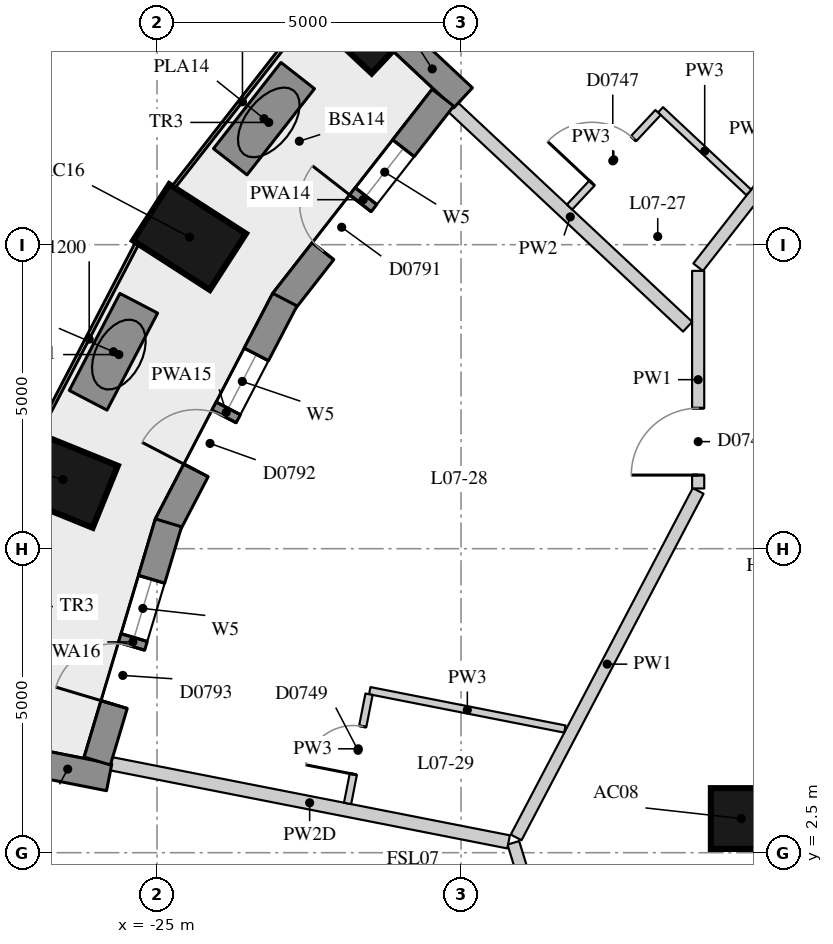
"""IFC4 building model, lengths in metres.
Left out: names, types, materials, properties, quantities, classifications, styles, units other than length and angle.
Written with IfcOpenShell. Run it as: python <this file> out.ifc"""

import sys

from ifc_helpers import new_model, si_unit, direction, frame, frame_2d, origin, origin_2d, place, context, subcontext, project, spatial, rectangle, extrude, element, fill, save


model = new_model("IFC4")
c1 = context("Model", 3, precision=1e-05, world=origin(), true_north=direction((0.0, 1.0)))
c2 = subcontext(c1, "Body", "Model", "MODEL_VIEW")
j1 = project(units=[si_unit("LENGTHUNIT", "METRE"), si_unit("PLANEANGLEUNIT", "RADIAN")], contexts=[c1])
p1 = place(None, origin())
s1 = spatial("IfcSite", under=j1, at=p1, CompositionType="ELEMENT")
p2 = place(p1, origin())
s2 = spatial("IfcBuilding", under=s1, at=p2, CompositionType="ELEMENT")
p3 = place(p2, frame((0.0, 0.0, 31.6)))
s3 = spatial("IfcBuildingStorey", under=s2, at=p3, CompositionType="ELEMENT", Elevation=31.6)
for number, where, z_axis, x_axis in (
    (1, (-21.641, 16.23, 0.0), (0.0, 0.0, 1.0), (-0.73, 0.683, 0.0)),
    (2, (-24.465, 12.625, 0.0), (0.0, 0.0, 1.0), (-0.841, 0.541, 0.0)),
    (3, (-26.546, 8.636, 0.0), (0.0, 0.0, 1.0), (-0.927, 0.376, 0.0)),
):
    element("IfcColumn", number, at=place(p3, frame(where, z_axis=z_axis, x_axis=x_axis)), inside=s3, PredefinedType="COLUMN", context=c2, shape_type="SweptSolid", body=[
        extrude(rectangle(XDim=1.5, YDim=1.1, at=origin_2d()), origin(), (0.0, 0.0, 1.0), 3.3),
    ])
p4 = place(p3, frame((-15.391, 3.062, 0.0), z_axis=(0.0, 0.0, 1.0), x_axis=(1.0, 0.0, 0.0)))
e4 = element("IfcColumn", 4, at=p4, inside=s3, PredefinedType="COLUMN", context=c2, shape_type="SweptSolid", body=[
    extrude(rectangle(XDim=1.0, YDim=1.0, at=origin_2d()), origin(), (0.0, 0.0, 1.0), 3.3),
])
p5 = place(p3, frame((-20.982, 15.866, 0.0), z_axis=(0.0, 0.0, 1.0), x_axis=(0.730062381614, -0.683380508174, 0.0)))
e5 = element("IfcWall", 5, at=p5, inside=s3, PredefinedType="SOLIDWALL", context=c2, shape_type="SweptSolid", body=[
    extrude(rectangle(XDim=1.391, YDim=0.45, at=frame_2d((0.696, 0.0))), origin(), (0.0, 0.0, 1.0), 3.02),
])
p6 = place(p3, frame((-27.151, 4.009, 0.0), z_axis=(0.0, 0.0, 1.0), x_axis=(0.981197182729, -0.1930080014, 0.0)))
e6 = element("IfcWall", 6, at=p6, inside=s3, PredefinedType="SOLIDWALL", context=c2, shape_type="SweptSolid", body=[
    extrude(rectangle(XDim=1.39, YDim=0.45, at=frame_2d((0.695, 0.0))), origin(), (0.0, 0.0, 1.0), 2.47),
])
p7 = place(p3, frame((-20.298, 14.918, 0.0), z_axis=(0.0, 0.0, 1.0), x_axis=(-0.615578403957, -0.788075649022, 0.0)))
e7 = element("IfcWall", 7, at=p7, inside=s3, PredefinedType="SOLIDWALL", context=c2, shape_type="SweptSolid", body=[
    extrude(rectangle(XDim=4.259, YDim=0.45, at=frame_2d((2.129, 0.0))), origin(), (0.0, 0.0, 1.0), 3.02),
])
p8 = place(p7, frame((1.054, 0.0, 0.4)))
e8 = element("IfcOpeningElement", 8, at=p8, cuts=e7, PredefinedType="OPENING", context=c2, shape_type="SweptSolid", body=[
    extrude(rectangle(XDim=1.0, YDim=1.75, at=frame_2d((0.5, 0.875))), frame((0.0, 0.235, 0.0), z_axis=(0.0, -1.0, 0.0), x_axis=(1.0, 0.0, 0.0)), (0.0, 0.0, 1.0), 0.47),
])
p9 = place(p7, frame((2.204, 0.0, 0.0)))
e9 = element("IfcOpeningElement", 9, at=p9, cuts=e7, PredefinedType="OPENING", context=c2, shape_type="SweptSolid", body=[
    extrude(rectangle(XDim=1.0, YDim=2.15, at=frame_2d((0.5, 1.075))), frame((0.0, 0.235, 0.0), z_axis=(0.0, -1.0, 0.0), x_axis=(1.0, 0.0, 0.0)), (0.0, 0.0, 1.0), 0.47),
])
p10 = place(p3, frame((-22.897, 11.597, 0.0), z_axis=(0.0, 0.0, 1.0), x_axis=(-0.461514453451, -0.887132689769, 0.0)))
e10 = element("IfcWall", 10, at=p10, inside=s3, PredefinedType="SOLIDWALL", context=c2, shape_type="SweptSolid", body=[
    extrude(rectangle(XDim=4.183, YDim=0.45, at=frame_2d((2.091, 0.0))), origin(), (0.0, 0.0, 1.0), 3.02),
])
p11 = place(p10, frame((1.016, 0.0, 0.4)))
e11 = element("IfcOpeningElement", 11, at=p11, cuts=e10, PredefinedType="OPENING", context=c2, shape_type="SweptSolid", body=[
    extrude(rectangle(XDim=1.0, YDim=1.75, at=frame_2d((0.5, 0.875))), frame((0.0, 0.235, 0.0), z_axis=(0.0, -1.0, 0.0), x_axis=(1.0, 0.0, 0.0)), (0.0, 0.0, 1.0), 0.47),
])
p12 = place(p10, frame((2.167, 0.0, 0.0)))
e12 = element("IfcOpeningElement", 12, at=p12, cuts=e10, PredefinedType="OPENING", context=c2, shape_type="SweptSolid", body=[
    extrude(rectangle(XDim=1.0, YDim=2.15, at=frame_2d((0.5, 1.075))), frame((0.0, 0.235, 0.0), z_axis=(0.0, -1.0, 0.0), x_axis=(1.0, 0.0, 0.0)), (0.0, 0.0, 1.0), 0.47),
])
p13 = place(p3, frame((-24.812, 7.925, 0.0), z_axis=(0.0, 0.0, 1.0), x_axis=(-0.286389028326, -0.95811341941, 0.0)))
e13 = element("IfcWall", 13, at=p13, inside=s3, PredefinedType="SOLIDWALL", context=c2, shape_type="SweptSolid", body=[
    extrude(rectangle(XDim=4.088, YDim=0.45, at=frame_2d((2.044, 0.0))), origin(), (0.0, 0.0, 1.0), 3.02),
])
p14 = place(p13, frame((0.969, 0.0, 0.4)))
e14 = element("IfcOpeningElement", 14, at=p14, cuts=e13, PredefinedType="OPENING", context=c2, shape_type="SweptSolid", body=[
    extrude(rectangle(XDim=1.0, YDim=1.75, at=frame_2d((0.5, 0.875))), frame((0.0, 0.235, 0.0), z_axis=(0.0, -1.0, 0.0), x_axis=(1.0, 0.0, 0.0)), (0.0, 0.0, 1.0), 0.47),
])
p15 = place(p13, frame((2.119, 0.0, 0.0)))
e15 = element("IfcOpeningElement", 15, at=p15, cuts=e13, PredefinedType="OPENING", context=c2, shape_type="SweptSolid", body=[
    extrude(rectangle(XDim=1.0, YDim=2.15, at=frame_2d((0.5, 1.075))), frame((0.0, 0.235, 0.0), z_axis=(0.0, -1.0, 0.0), x_axis=(1.0, 0.0, 0.0)), (0.0, 0.0, 1.0), 0.47),
])
p16 = place(p3, frame((-22.686, 15.281, 0.0), z_axis=(0.0, 0.0, 1.0), x_axis=(-0.616622746332, -0.787258781282, 0.0)))
e16 = element("IfcWall", 16, at=p16, inside=s3, PredefinedType="USERDEFINED", context=c2, shape_type="SweptSolid", body=[
    extrude(rectangle(XDim=1.8, YDim=0.7, at=frame_2d((0.9, 0.0))), origin(), (0.0, 0.0, 1.0), 0.75),
])
p17 = place(p3, frame((-25.3, 11.537, 0.0), z_axis=(0.0, 0.0, 1.0), x_axis=(-0.462501112253, -0.886618701114, 0.0)))
e17 = element("IfcWall", 17, at=p17, inside=s3, PredefinedType="USERDEFINED", context=c2, shape_type="SweptSolid", body=[
    extrude(rectangle(XDim=1.8, YDim=0.7, at=frame_2d((0.9, 0.0))), origin(), (0.0, 0.0, 1.0), 0.75),
])
p18 = place(p3, frame((-16.1, 12.13, 0.0), z_axis=(0.0, 0.0, 1.0), x_axis=(0.615593476668, 0.788063875256, 0.0)))
e18 = element("IfcWall", 18, at=p18, inside=s3, PredefinedType="PARTITIONING", context=c2, shape_type="SweptSolid", body=[
    extrude(rectangle(XDim=4.404, YDim=0.2, at=frame_2d((2.202, 0.0))), origin(), (0.0, 0.0, 1.0), 3.02),
])
p19 = place(p3, frame((-16.112, -7.203, 0.0), z_axis=(0.0, 0.0, 1.0), x_axis=(-0.293439067289, 0.95597777892, 0.0)))
e19 = element("IfcWall", 19, at=p19, inside=s3, PredefinedType="PARTITIONING", context=c2, shape_type="SweptSolid", body=[
    extrude(rectangle(XDim=10.319, YDim=0.2, at=frame_2d((5.16, 0.0))), origin(), (0.0, 0.0, 1.0), 3.02),
])
p20 = place(p19, frame((7.444, 0.0, 0.0)))
e20 = element("IfcOpeningElement", 20, at=p20, cuts=e19, PredefinedType="OPENING", context=c2, shape_type="SweptSolid", body=[
    extrude(rectangle(XDim=1.1, YDim=2.1, at=frame_2d((0.55, 1.05))), frame((0.0, 0.11, 0.0), z_axis=(0.0, -1.0, 0.0), x_axis=(1.0, 0.0, 0.0)), (0.0, 0.0, 1.0), 0.22),
])
p21 = place(p19, frame((2.081, 0.0, 0.0)))
e21 = element("IfcOpeningElement", 21, at=p21, cuts=e19, PredefinedType="OPENING", context=c2, shape_type="SweptSolid", body=[
    extrude(rectangle(XDim=0.9, YDim=2.1, at=frame_2d((0.45, 1.05))), frame((0.0, 0.11, 0.0), z_axis=(0.0, -1.0, 0.0), x_axis=(1.0, 0.0, 0.0)), (0.0, 0.0, 1.0), 0.22),
])
p22 = place(p3, frame((-19.094, 2.751, 0.0), z_axis=(0.0, 0.0, 1.0), x_axis=(0.464994434802, 0.88531360297, 0.0)))
e22 = element("IfcWall", 22, at=p22, inside=s3, PredefinedType="PARTITIONING", context=c2, shape_type="SweptSolid", body=[
    extrude(rectangle(XDim=6.438, YDim=0.2, at=frame_2d((3.219, 0.0))), origin(), (0.0, 0.0, 1.0), 3.02),
])
p23 = place(p3, frame((-16.1, 8.491, 0.0), z_axis=(0.0, 0.0, 1.0), x_axis=(0.0, 1.0, 0.0)))
e23 = element("IfcWall", 23, at=p23, inside=s3, PredefinedType="PARTITIONING", context=c2, shape_type="SweptSolid", body=[
    extrude(rectangle(XDim=3.579, YDim=0.2, at=frame_2d((1.79, 0.0))), origin(), (0.0, 0.0, 1.0), 3.02),
])
p24 = place(p23, frame((0.22, 0.0, 0.0)))
e24 = element("IfcOpeningElement", 24, at=p24, cuts=e23, PredefinedType="OPENING", context=c2, shape_type="SweptSolid", body=[
    extrude(rectangle(XDim=1.1, YDim=2.1, at=frame_2d((0.55, 1.05))), frame((0.0, 0.11, 0.0), z_axis=(0.0, -1.0, 0.0), x_axis=(1.0, 0.0, 0.0)), (0.0, 0.0, 1.0), 0.22),
])
p25 = place(p3, frame((-20.133, 14.764, 0.0), z_axis=(0.0, 0.0, 1.0), x_axis=(0.730065516357, -0.68337715928, 0.0)))
e25 = element("IfcWall", 25, at=p25, inside=s3, PredefinedType="PARTITIONING", context=c2, shape_type="SweptSolid", body=[
    extrude(rectangle(XDim=5.287, YDim=0.22, at=frame_2d((2.643, 0.0))), origin(), (0.0, 0.0, 1.0), 3.02),
])
p26 = place(p3, frame((-25.761, 3.964, 0.0), z_axis=(0.0, 0.0, 1.0), x_axis=(0.981216162043, -0.192911490963, 0.0)))
e26 = element("IfcWall", 26, at=p26, inside=s3, PredefinedType="PARTITIONING", context=c2, shape_type="SweptSolid", body=[
    extrude(rectangle(XDim=6.668, YDim=0.22, at=frame_2d((3.334, 0.0))), origin(), (0.0, 0.0, 1.0), 2.47),
])
p27 = place(p3, frame((-15.267, 13.359, 0.0), z_axis=(0.0, 0.0, 1.0), x_axis=(-0.730103481834, 0.683336597742, 0.0)))
e27 = element("IfcWall", 27, at=p27, inside=s3, PredefinedType="PARTITIONING", context=c2, shape_type="SweptSolid", body=[
    extrude(rectangle(XDim=1.989, YDim=0.12, at=frame_2d((0.995, 0.0))), origin(), (0.0, 0.0, 1.0), 3.02),
])
p28 = place(p3, frame((-18.292, 4.534, 0.0), z_axis=(0.0, 0.0, 1.0), x_axis=(-0.981198627208, 0.193000657942, 0.0)))
e28 = element("IfcWall", 28, at=p28, inside=s3, PredefinedType="PARTITIONING", context=c2, shape_type="SweptSolid", body=[
    extrude(rectangle(XDim=3.271, YDim=0.12, at=frame_2d((1.636, 0.0))), origin(), (0.0, 0.0, 1.0), 3.02),
])
p29 = place(p3, frame((-16.76, 14.674, 0.0), z_axis=(0.0, 0.0, 1.0), x_axis=(-0.683334594436, -0.730105356813, 0.0)))
e29 = element("IfcWall", 29, at=p29, inside=s3, PredefinedType="PARTITIONING", context=c2, shape_type="SweptSolid", body=[
    extrude(rectangle(XDim=2.13, YDim=0.12, at=frame_2d((1.065, 0.0))), origin(), (0.0, 0.0, 1.0), 3.02),
])
p30 = place(p29, frame((0.59, 0.0, 0.0)))
e30 = element("IfcOpeningElement", 30, at=p30, cuts=e29, PredefinedType="OPENING", context=c2, shape_type="SweptSolid", body=[
    extrude(rectangle(XDim=1.0, YDim=2.1, at=frame_2d((0.5, 1.05))), frame((0.0, 0.07, 0.0), z_axis=(0.0, -1.0, 0.0), x_axis=(1.0, 0.0, 0.0)), (0.0, 0.0, 1.0), 0.14),
])
p31 = place(p3, frame((-21.513, 5.106, 0.0), z_axis=(0.0, 0.0, 1.0), x_axis=(-0.19288291118, -0.981221780524, 0.0)))
e31 = element("IfcWall", 31, at=p31, inside=s3, PredefinedType="PARTITIONING", context=c2, shape_type="SweptSolid", body=[
    extrude(rectangle(XDim=1.83, YDim=0.12, at=frame_2d((0.915, 0.0))), origin(), (0.0, 0.0, 1.0), 3.02),
])
p32 = place(p31, frame((0.54, 0.0, 0.0)))
e32 = element("IfcOpeningElement", 32, at=p32, cuts=e31, PredefinedType="OPENING", context=c2, shape_type="SweptSolid", body=[
    extrude(rectangle(XDim=0.8, YDim=2.1, at=frame_2d((0.4, 1.05))), frame((0.0, 0.07, 0.0), z_axis=(0.0, -1.0, 0.0), x_axis=(1.0, 0.0, 0.0)), (0.0, 0.0, 1.0), 0.14),
])
p33 = place(p8, origin())
e33 = element("IfcWindow", 33, at=p33, inside=s3, PartitioningType="SINGLE_PANEL", PredefinedType="WINDOW", context=c2, shape_type="SweptSolid", body=[
    extrude(rectangle(XDim=1.0, YDim=1.75, at=frame_2d((0.5, 0.875))), frame((0.0, 0.035, 0.0), z_axis=(0.0, -1.0, 0.0), x_axis=(1.0, 0.0, 0.0)), (0.0, 0.0, 1.0), 0.06),
])
fill(e8, e33)
p34 = place(p9, frame((1.0, 0.0, 0.0), z_axis=(0.0, 0.0, 1.0), x_axis=(-1.0, 0.0, 0.0)))
e34 = element("IfcDoor", 34, at=p34, inside=s3, OperationType="SINGLE_SWING_RIGHT", PredefinedType="DOOR", context=c2, shape_type="SweptSolid", body=[
    extrude(rectangle(XDim=1.0, YDim=2.15, at=frame_2d((0.5, 1.075))), frame((0.0, 0.075, 0.0), z_axis=(0.0, -1.0, 0.0), x_axis=(1.0, 0.0, 0.0)), (0.0, 0.0, 1.0), 0.05),
])
fill(e9, e34)
p35 = place(p11, origin())
e35 = element("IfcWindow", 35, at=p35, inside=s3, PartitioningType="SINGLE_PANEL", PredefinedType="WINDOW", context=c2, shape_type="SweptSolid", body=[
    extrude(rectangle(XDim=1.0, YDim=1.75, at=frame_2d((0.5, 0.875))), frame((0.0, 0.035, 0.0), z_axis=(0.0, -1.0, 0.0), x_axis=(1.0, 0.0, 0.0)), (0.0, 0.0, 1.0), 0.06),
])
fill(e11, e35)
p36 = place(p12, frame((1.0, 0.0, 0.0), z_axis=(0.0, 0.0, 1.0), x_axis=(-1.0, 0.0, 0.0)))
e36 = element("IfcDoor", 36, at=p36, inside=s3, OperationType="SINGLE_SWING_LEFT", PredefinedType="DOOR", context=c2, shape_type="SweptSolid", body=[
    extrude(rectangle(XDim=1.0, YDim=2.15, at=frame_2d((0.5, 1.075))), frame((0.0, 0.075, 0.0), z_axis=(0.0, -1.0, 0.0), x_axis=(1.0, 0.0, 0.0)), (0.0, 0.0, 1.0), 0.05),
])
fill(e12, e36)
p37 = place(p14, origin())
e37 = element("IfcWindow", 37, at=p37, inside=s3, PartitioningType="SINGLE_PANEL", PredefinedType="WINDOW", context=c2, shape_type="SweptSolid", body=[
    extrude(rectangle(XDim=1.0, YDim=1.75, at=frame_2d((0.5, 0.875))), frame((0.0, 0.035, 0.0), z_axis=(0.0, -1.0, 0.0), x_axis=(1.0, 0.0, 0.0)), (0.0, 0.0, 1.0), 0.06),
])
fill(e14, e37)
p38 = place(p15, frame((1.0, 0.0, 0.0), z_axis=(0.0, 0.0, 1.0), x_axis=(-1.0, 0.0, 0.0)))
e38 = element("IfcDoor", 38, at=p38, inside=s3, OperationType="SINGLE_SWING_LEFT", PredefinedType="DOOR", context=c2, shape_type="SweptSolid", body=[
    extrude(rectangle(XDim=1.0, YDim=2.15, at=frame_2d((0.5, 1.075))), frame((0.0, 0.075, 0.0), z_axis=(0.0, -1.0, 0.0), x_axis=(1.0, 0.0, 0.0)), (0.0, 0.0, 1.0), 0.05),
])
fill(e15, e38)
p39 = place(p30, origin())
e39 = element("IfcDoor", 39, at=p39, inside=s3, OperationType="SINGLE_SWING_LEFT", PredefinedType="DOOR", context=c2, shape_type="SweptSolid", body=[
    extrude(rectangle(XDim=1.0, YDim=2.1, at=frame_2d((0.5, 1.05))), frame((0.0, 0.025, 0.0), z_axis=(0.0, -1.0, 0.0), x_axis=(1.0, 0.0, 0.0)), (0.0, 0.0, 1.0), 0.05),
])
fill(e30, e39)
p40 = place(p24, origin())
e40 = element("IfcDoor", 40, at=p40, inside=s3, OperationType="SINGLE_SWING_LEFT", PredefinedType="DOOR", context=c2, shape_type="SweptSolid", body=[
    extrude(rectangle(XDim=1.1, YDim=2.1, at=frame_2d((0.55, 1.05))), frame((0.0, 0.025, 0.0), z_axis=(0.0, -1.0, 0.0), x_axis=(1.0, 0.0, 0.0)), (0.0, 0.0, 1.0), 0.05),
])
fill(e24, e40)
p41 = place(p32, origin())
e41 = element("IfcDoor", 41, at=p41, inside=s3, OperationType="SINGLE_SWING_LEFT", PredefinedType="DOOR", context=c2, shape_type="SweptSolid", body=[
    extrude(rectangle(XDim=0.8, YDim=2.1, at=frame_2d((0.4, 1.05))), frame((0.0, 0.025, 0.0), z_axis=(0.0, -1.0, 0.0), x_axis=(1.0, 0.0, 0.0)), (0.0, 0.0, 1.0), 0.05),
])
fill(e32, e41)
save(model, sys.argv[1])
